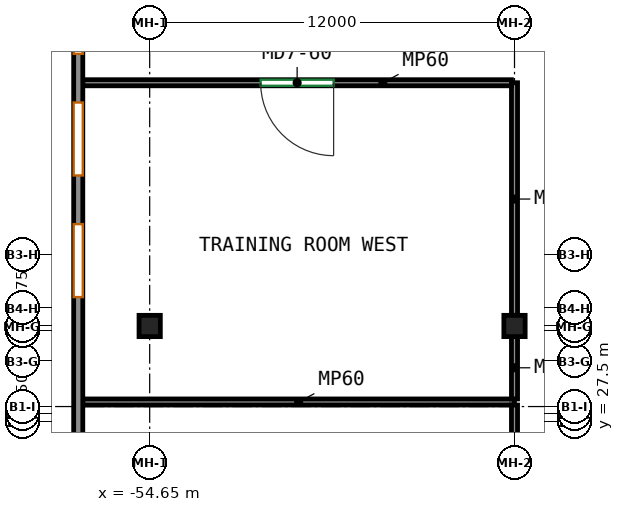
"""IFC4 building model, lengths in metres.
Left out: names, types, materials, properties, quantities, classifications, styles, units other than length and angle.
Written with IfcOpenShell. Run it as: python <this file> out.ifc"""

import sys

from ifc_helpers import new_model, si_unit, direction, frame, frame_2d, origin, origin_2d, place, context, subcontext, project, spatial, rectangle, extrude, source, transform, mapped, element, fill, save


model = new_model("IFC4")
c1 = context("Model", 3, precision=1e-05, world=origin(), true_north=direction((0.0, 1.0)))
c2 = subcontext(c1, "Body", "Model", "MODEL_VIEW")
j1 = project(units=[si_unit("LENGTHUNIT", "METRE"), si_unit("PLANEANGLEUNIT", "RADIAN")], contexts=[c1])
p1 = place(None, origin())
s1 = spatial("IfcSite", under=j1, at=p1, CompositionType="ELEMENT")
p2 = place(p1, origin())
s2 = spatial("IfcBuilding", under=s1, at=p2, CompositionType="ELEMENT")
p3 = place(p2, frame((0.0, 0.0, 18.0)))
s3 = spatial("IfcBuildingStorey", under=s2, at=p3, CompositionType="ELEMENT", Elevation=18.0)
m1 = source(origin(), c2, "Body", "SweptSolid", [
    extrude(rectangle(XDim=0.7, YDim=0.7, at=origin_2d()), origin(), (0.0, 0.0, 1.0), 4.1),
])
for number, where, z_axis, x_axis in (
    (1, (-54.65, 30.65, 0.0), (0.0, 0.0, 1.0), (1.0, 0.0, 0.0)),
    (2, (-42.65, 30.65, 0.0), (0.0, 0.0, 1.0), (1.0, 0.0, 0.0)),
):
    element("IfcColumn", number, at=place(p3, frame(where, z_axis=z_axis, x_axis=x_axis)), inside=s3, PredefinedType="COLUMN", context=c2, shape_type="MappedRepresentation", body=[
        mapped(m1, transform((0.0, 0.0, 0.0))),
    ])
m2 = source(origin(), c2, "Body", "SweptSolid", [
    extrude(rectangle(XDim=100.7, YDim=0.3, at=frame_2d((50.35, 0.0))), origin(), (0.0, 0.0, 1.0), 4.1),
])
p4 = place(p3, frame((-57.0, -43.55, 0.0), z_axis=(0.0, 0.0, 1.0), x_axis=(0.0, 1.0, 0.0)))
e3 = element("IfcWall", 3, at=p4, inside=s3, PredefinedType="SOLIDWALL", context=c2, shape_type="MappedRepresentation", body=[
    mapped(m2, transform((0.0, 0.0, 0.0))),
])
p5 = place(p4, frame((3.15, 0.0, 0.9)))
e4 = element("IfcOpeningElement", 4, at=p5, cuts=e3, PredefinedType="OPENING", context=c2, shape_type="SweptSolid", body=[
    extrude(rectangle(XDim=2.4, YDim=1.8, at=frame_2d((1.2, 0.9))), frame((0.0, 0.16, 0.0), z_axis=(0.0, -1.0, 0.0), x_axis=(1.0, 0.0, 0.0)), (0.0, 0.0, 1.0), 0.32),
])
p6 = place(p4, frame((7.15, 0.0, 0.9)))
e5 = element("IfcOpeningElement", 5, at=p6, cuts=e3, PredefinedType="OPENING", context=c2, shape_type="SweptSolid", body=[
    extrude(rectangle(XDim=2.4, YDim=1.8, at=frame_2d((1.2, 0.9))), frame((0.0, 0.16, 0.0), z_axis=(0.0, -1.0, 0.0), x_axis=(1.0, 0.0, 0.0)), (0.0, 0.0, 1.0), 0.32),
])
p7 = place(p4, frame((11.15, 0.0, 0.9)))
e6 = element("IfcOpeningElement", 6, at=p7, cuts=e3, PredefinedType="OPENING", context=c2, shape_type="SweptSolid", body=[
    extrude(rectangle(XDim=2.4, YDim=1.8, at=frame_2d((1.2, 0.9))), frame((0.0, 0.16, 0.0), z_axis=(0.0, -1.0, 0.0), x_axis=(1.0, 0.0, 0.0)), (0.0, 0.0, 1.0), 0.32),
])
p8 = place(p4, frame((19.15, 0.0, 0.9)))
e7 = element("IfcOpeningElement", 7, at=p8, cuts=e3, PredefinedType="OPENING", context=c2, shape_type="SweptSolid", body=[
    extrude(rectangle(XDim=2.4, YDim=1.8, at=frame_2d((1.2, 0.9))), frame((0.0, 0.16, 0.0), z_axis=(0.0, -1.0, 0.0), x_axis=(1.0, 0.0, 0.0)), (0.0, 0.0, 1.0), 0.32),
])
p9 = place(p4, frame((23.15, 0.0, 0.9)))
e8 = element("IfcOpeningElement", 8, at=p9, cuts=e3, PredefinedType="OPENING", context=c2, shape_type="SweptSolid", body=[
    extrude(rectangle(XDim=2.4, YDim=1.8, at=frame_2d((1.2, 0.9))), frame((0.0, 0.16, 0.0), z_axis=(0.0, -1.0, 0.0), x_axis=(1.0, 0.0, 0.0)), (0.0, 0.0, 1.0), 0.32),
])
p10 = place(p4, frame((27.15, 0.0, 0.9)))
e9 = element("IfcOpeningElement", 9, at=p10, cuts=e3, PredefinedType="OPENING", context=c2, shape_type="SweptSolid", body=[
    extrude(rectangle(XDim=2.4, YDim=1.8, at=frame_2d((1.2, 0.9))), frame((0.0, 0.16, 0.0), z_axis=(0.0, -1.0, 0.0), x_axis=(1.0, 0.0, 0.0)), (0.0, 0.0, 1.0), 0.32),
])
p11 = place(p4, frame((31.15, 0.0, 0.9)))
e10 = element("IfcOpeningElement", 10, at=p11, cuts=e3, PredefinedType="OPENING", context=c2, shape_type="SweptSolid", body=[
    extrude(rectangle(XDim=2.4, YDim=1.8, at=frame_2d((1.2, 0.9))), frame((0.0, 0.16, 0.0), z_axis=(0.0, -1.0, 0.0), x_axis=(1.0, 0.0, 0.0)), (0.0, 0.0, 1.0), 0.32),
])
p12 = place(p4, frame((39.15, 0.0, 0.9)))
e11 = element("IfcOpeningElement", 11, at=p12, cuts=e3, PredefinedType="OPENING", context=c2, shape_type="SweptSolid", body=[
    extrude(rectangle(XDim=2.4, YDim=1.8, at=frame_2d((1.2, 0.9))), frame((0.0, 0.16, 0.0), z_axis=(0.0, -1.0, 0.0), x_axis=(1.0, 0.0, 0.0)), (0.0, 0.0, 1.0), 0.32),
])
p13 = place(p4, frame((43.15, 0.0, 0.9)))
e12 = element("IfcOpeningElement", 12, at=p13, cuts=e3, PredefinedType="OPENING", context=c2, shape_type="SweptSolid", body=[
    extrude(rectangle(XDim=2.4, YDim=1.8, at=frame_2d((1.2, 0.9))), frame((0.0, 0.16, 0.0), z_axis=(0.0, -1.0, 0.0), x_axis=(1.0, 0.0, 0.0)), (0.0, 0.0, 1.0), 0.32),
])
p14 = place(p4, frame((51.15, 0.0, 0.9)))
e13 = element("IfcOpeningElement", 13, at=p14, cuts=e3, PredefinedType="OPENING", context=c2, shape_type="SweptSolid", body=[
    extrude(rectangle(XDim=2.4, YDim=1.8, at=frame_2d((1.2, 0.9))), frame((0.0, 0.16, 0.0), z_axis=(0.0, -1.0, 0.0), x_axis=(1.0, 0.0, 0.0)), (0.0, 0.0, 1.0), 0.32),
])
p15 = place(p4, frame((55.15, 0.0, 0.9)))
e14 = element("IfcOpeningElement", 14, at=p15, cuts=e3, PredefinedType="OPENING", context=c2, shape_type="SweptSolid", body=[
    extrude(rectangle(XDim=2.4, YDim=1.8, at=frame_2d((1.2, 0.9))), frame((0.0, 0.16, 0.0), z_axis=(0.0, -1.0, 0.0), x_axis=(1.0, 0.0, 0.0)), (0.0, 0.0, 1.0), 0.32),
])
p16 = place(p4, frame((59.15, 0.0, 0.9)))
e15 = element("IfcOpeningElement", 15, at=p16, cuts=e3, PredefinedType="OPENING", context=c2, shape_type="SweptSolid", body=[
    extrude(rectangle(XDim=2.4, YDim=1.8, at=frame_2d((1.2, 0.9))), frame((0.0, 0.16, 0.0), z_axis=(0.0, -1.0, 0.0), x_axis=(1.0, 0.0, 0.0)), (0.0, 0.0, 1.0), 0.32),
])
p17 = place(p4, frame((63.15, 0.0, 0.9)))
e16 = element("IfcOpeningElement", 16, at=p17, cuts=e3, PredefinedType="OPENING", context=c2, shape_type="SweptSolid", body=[
    extrude(rectangle(XDim=2.4, YDim=1.8, at=frame_2d((1.2, 0.9))), frame((0.0, 0.16, 0.0), z_axis=(0.0, -1.0, 0.0), x_axis=(1.0, 0.0, 0.0)), (0.0, 0.0, 1.0), 0.32),
])
p18 = place(p4, frame((67.15, 0.0, 0.9)))
e17 = element("IfcOpeningElement", 17, at=p18, cuts=e3, PredefinedType="OPENING", context=c2, shape_type="SweptSolid", body=[
    extrude(rectangle(XDim=2.4, YDim=1.8, at=frame_2d((1.2, 0.9))), frame((0.0, 0.16, 0.0), z_axis=(0.0, -1.0, 0.0), x_axis=(1.0, 0.0, 0.0)), (0.0, 0.0, 1.0), 0.32),
])
p19 = place(p4, frame((75.15, 0.0, 0.9)))
e18 = element("IfcOpeningElement", 18, at=p19, cuts=e3, PredefinedType="OPENING", context=c2, shape_type="SweptSolid", body=[
    extrude(rectangle(XDim=2.4, YDim=1.8, at=frame_2d((1.2, 0.9))), frame((0.0, 0.16, 0.0), z_axis=(0.0, -1.0, 0.0), x_axis=(1.0, 0.0, 0.0)), (0.0, 0.0, 1.0), 0.32),
])
p20 = place(p4, frame((79.15, 0.0, 0.9)))
e19 = element("IfcOpeningElement", 19, at=p20, cuts=e3, PredefinedType="OPENING", context=c2, shape_type="SweptSolid", body=[
    extrude(rectangle(XDim=2.4, YDim=1.8, at=frame_2d((1.2, 0.9))), frame((0.0, 0.16, 0.0), z_axis=(0.0, -1.0, 0.0), x_axis=(1.0, 0.0, 0.0)), (0.0, 0.0, 1.0), 0.32),
])
p21 = place(p4, frame((83.15, 0.0, 0.9)))
e20 = element("IfcOpeningElement", 20, at=p21, cuts=e3, PredefinedType="OPENING", context=c2, shape_type="SweptSolid", body=[
    extrude(rectangle(XDim=2.4, YDim=1.8, at=frame_2d((1.2, 0.9))), frame((0.0, 0.16, 0.0), z_axis=(0.0, -1.0, 0.0), x_axis=(1.0, 0.0, 0.0)), (0.0, 0.0, 1.0), 0.32),
])
p22 = place(p4, frame((87.15, 0.0, 0.9)))
e21 = element("IfcOpeningElement", 21, at=p22, cuts=e3, PredefinedType="OPENING", context=c2, shape_type="SweptSolid", body=[
    extrude(rectangle(XDim=2.4, YDim=1.8, at=frame_2d((1.2, 0.9))), frame((0.0, 0.16, 0.0), z_axis=(0.0, -1.0, 0.0), x_axis=(1.0, 0.0, 0.0)), (0.0, 0.0, 1.0), 0.32),
])
p23 = place(p4, frame((91.15, 0.0, 0.9)))
e22 = element("IfcOpeningElement", 22, at=p23, cuts=e3, PredefinedType="OPENING", context=c2, shape_type="SweptSolid", body=[
    extrude(rectangle(XDim=2.4, YDim=1.8, at=frame_2d((1.2, 0.9))), frame((0.0, 0.16, 0.0), z_axis=(0.0, -1.0, 0.0), x_axis=(1.0, 0.0, 0.0)), (0.0, 0.0, 1.0), 0.32),
])
p24 = place(p4, frame((95.15, 0.0, 0.9)))
e23 = element("IfcOpeningElement", 23, at=p24, cuts=e3, PredefinedType="OPENING", context=c2, shape_type="SweptSolid", body=[
    extrude(rectangle(XDim=2.4, YDim=1.8, at=frame_2d((1.2, 0.9))), frame((0.0, 0.16, 0.0), z_axis=(0.0, -1.0, 0.0), x_axis=(1.0, 0.0, 0.0)), (0.0, 0.0, 1.0), 0.32),
])
m3 = source(origin(), c2, "Body", "SweptSolid", [
    extrude(rectangle(XDim=14.2, YDim=0.2, at=frame_2d((7.1, 0.0))), origin(), (0.0, 0.0, 1.0), 3.3),
])
p25 = place(p3, frame((-56.85, 28.15, 0.0), z_axis=(0.0, 0.0, 1.0), x_axis=(1.0, 0.0, 0.0)))
e24 = element("IfcWall", 24, at=p25, inside=s3, PredefinedType="PARTITIONING", context=c2, shape_type="MappedRepresentation", body=[
    mapped(m3, transform((0.0, 0.0, 0.0))),
])
m4 = source(origin(), c2, "Body", "SweptSolid", [
    extrude(rectangle(XDim=10.35, YDim=0.2, at=frame_2d((5.175, 0.0))), origin(), (0.0, 0.0, 1.0), 3.3),
])
p26 = place(p3, frame((-42.65, 17.7, 0.0), z_axis=(0.0, 0.0, 1.0), x_axis=(0.0, 1.0, 0.0)))
e25 = element("IfcWall", 25, at=p26, inside=s3, PredefinedType="PARTITIONING", context=c2, shape_type="MappedRepresentation", body=[
    mapped(m4, transform((0.0, 0.0, 0.0))),
])
p27 = place(p26, frame((3.975, 0.0, 0.0)))
e26 = element("IfcOpeningElement", 26, at=p27, cuts=e25, PredefinedType="OPENING", context=c2, shape_type="SweptSolid", body=[
    extrude(rectangle(XDim=2.4, YDim=2.4, at=frame_2d((1.2, 1.2))), frame((0.0, 0.11, 0.0), z_axis=(0.0, -1.0, 0.0), x_axis=(1.0, 0.0, 0.0)), (0.0, 0.0, 1.0), 0.22),
])
m5 = source(origin(), c2, "Body", "SweptSolid", [
    extrude(rectangle(XDim=2.05, YDim=0.2, at=frame_2d((1.025, 0.0))), origin(), (0.0, 0.0, 1.0), 3.3),
])
p28 = place(p3, frame((-42.65, 28.25, 0.0), z_axis=(0.0, 0.0, 1.0), x_axis=(0.0, 1.0, 0.0)))
e27 = element("IfcWall", 27, at=p28, inside=s3, PredefinedType="PARTITIONING", context=c2, shape_type="MappedRepresentation", body=[
    mapped(m5, transform((0.0, 0.0, 0.0))),
])
m6 = source(origin(), c2, "Body", "SweptSolid", [
    extrude(rectangle(XDim=7.65, YDim=0.2, at=frame_2d((3.825, 0.0))), origin(), (0.0, 0.0, 1.0), 3.3),
])
p29 = place(p3, frame((-42.65, 31.0, 0.0), z_axis=(0.0, 0.0, 1.0), x_axis=(0.0, 1.0, 0.0)))
e28 = element("IfcWall", 28, at=p29, inside=s3, PredefinedType="PARTITIONING", context=c2, shape_type="MappedRepresentation", body=[
    mapped(m6, transform((0.0, 0.0, 0.0))),
])
m7 = source(origin(), c2, "Body", "SweptSolid", [
    extrude(rectangle(XDim=14.1, YDim=0.2, at=frame_2d((7.05, 0.0))), origin(), (0.0, 0.0, 1.0), 3.3),
])
p30 = place(p3, frame((-42.75, 38.65, 0.0), z_axis=(0.0, 0.0, 1.0), x_axis=(-1.0, 0.0, 0.0)))
e29 = element("IfcWall", 29, at=p30, inside=s3, PredefinedType="PARTITIONING", context=c2, shape_type="MappedRepresentation", body=[
    mapped(m7, transform((0.0, 0.0, 0.0))),
])
p31 = place(p30, frame((5.85, 0.0, 0.0)))
e30 = element("IfcOpeningElement", 30, at=p31, cuts=e29, PredefinedType="OPENING", context=c2, shape_type="SweptSolid", body=[
    extrude(rectangle(XDim=2.4, YDim=2.4, at=frame_2d((1.2, 1.2))), frame((0.0, 0.11, 0.0), z_axis=(0.0, -1.0, 0.0), x_axis=(1.0, 0.0, 0.0)), (0.0, 0.0, 1.0), 0.22),
])
p32 = place(p19, origin())
e31 = element("IfcWindow", 31, at=p32, inside=s3, PartitioningType="SINGLE_PANEL", PredefinedType="WINDOW", context=c2, shape_type="SweptSolid", body=[
    extrude(rectangle(XDim=2.4, YDim=1.8, at=frame_2d((1.2, 0.9))), frame((0.0, 0.03, 0.0), z_axis=(0.0, -1.0, 0.0), x_axis=(1.0, 0.0, 0.0)), (0.0, 0.0, 1.0), 0.06),
])
fill(e18, e31)
p33 = place(p20, origin())
e32 = element("IfcWindow", 32, at=p33, inside=s3, PartitioningType="SINGLE_PANEL", PredefinedType="WINDOW", context=c2, shape_type="SweptSolid", body=[
    extrude(rectangle(XDim=2.4, YDim=1.8, at=frame_2d((1.2, 0.9))), frame((0.0, 0.03, 0.0), z_axis=(0.0, -1.0, 0.0), x_axis=(1.0, 0.0, 0.0)), (0.0, 0.0, 1.0), 0.06),
])
fill(e19, e32)
p34 = place(p21, origin())
e33 = element("IfcWindow", 33, at=p34, inside=s3, PartitioningType="SINGLE_PANEL", PredefinedType="WINDOW", context=c2, shape_type="SweptSolid", body=[
    extrude(rectangle(XDim=2.4, YDim=1.8, at=frame_2d((1.2, 0.9))), frame((0.0, 0.03, 0.0), z_axis=(0.0, -1.0, 0.0), x_axis=(1.0, 0.0, 0.0)), (0.0, 0.0, 1.0), 0.06),
])
fill(e20, e33)
p35 = place(p31, origin())
e34 = element("IfcDoor", 34, at=p35, inside=s3, OperationType="DOUBLE_DOOR_SINGLE_SWING", PredefinedType="DOOR", context=c2, shape_type="SweptSolid", body=[
    extrude(rectangle(XDim=2.4, YDim=2.4, at=frame_2d((1.2, 1.2))), frame((0.0, 0.025, 0.0), z_axis=(0.0, -1.0, 0.0), x_axis=(1.0, 0.0, 0.0)), (0.0, 0.0, 1.0), 0.05),
])
fill(e30, e34)
save(model, sys.argv[1])
